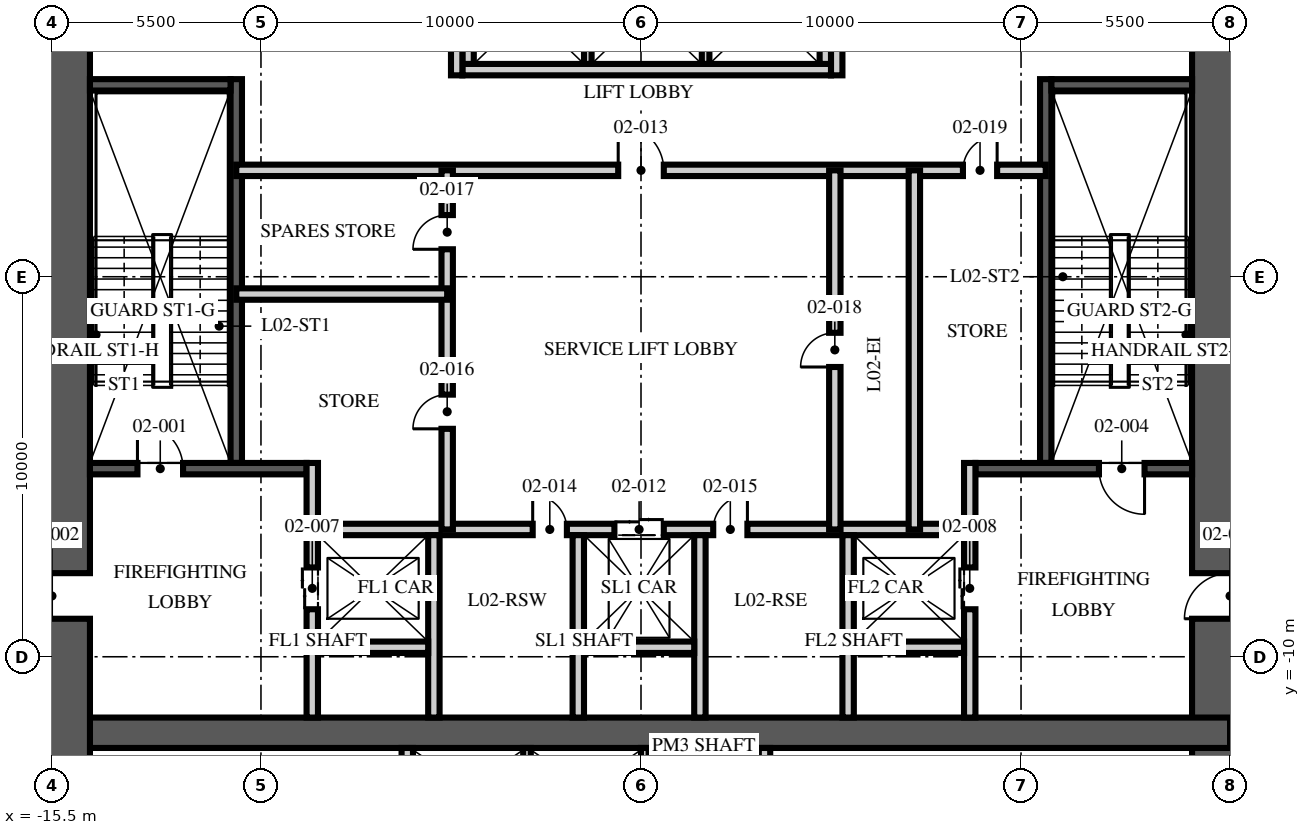
"""IFC4 building model, lengths in metres.
Left out: names, types, materials, properties, quantities, classifications, styles, units other than length and angle.
Written with IfcOpenShell. Run it as: python <this file> out.ifc"""

import sys

from ifc_helpers import new_model, si_unit, direction, frame, frame_2d, origin, place, context, subcontext, project, spatial, rectangle, extrude, element, fill, save


model = new_model("IFC4")
c1 = context("Model", 3, precision=1e-05, world=origin(), true_north=direction((0.0, 1.0)))
c2 = subcontext(c1, "Body", "Model", "MODEL_VIEW")
j1 = project(units=[si_unit("LENGTHUNIT", "METRE"), si_unit("PLANEANGLEUNIT", "RADIAN")], contexts=[c1])
p1 = place(None, origin())
s1 = spatial("IfcSite", under=j1, at=p1, CompositionType="ELEMENT")
p2 = place(p1, origin())
s2 = spatial("IfcBuilding", under=s1, at=p2, CompositionType="ELEMENT")
p3 = place(p2, frame((0.0, 0.0, 11.0)))
s3 = spatial("IfcBuildingStorey", under=s2, at=p3, CompositionType="ELEMENT", Elevation=11.0)
p4 = place(p3, frame((15.5, -15.5, -0.3), z_axis=(0.0, 0.0, 1.0), x_axis=(0.0, 1.0, 0.0)))
e1 = element("IfcWall", 1, at=p4, inside=s3, PredefinedType="SHEAR", context=c2, shape_type="SweptSolid", body=[
    extrude(rectangle(XDim=31.0, YDim=2.0, at=frame_2d((15.5, 0.0))), origin(), (0.0, 0.0, 1.0), 5.0),
])
p5 = place(p4, frame((6.5, 0.0, 0.3)))
e2 = element("IfcOpeningElement", 2, at=p5, cuts=e1, PredefinedType="OPENING", context=c2, shape_type="SweptSolid", body=[
    extrude(rectangle(XDim=1.2, YDim=2.1, at=frame_2d((0.6, 1.05))), frame((0.0, 1.01, 0.0), z_axis=(0.0, -1.0, 0.0), x_axis=(1.0, 0.0, 0.0)), (0.0, 0.0, 1.0), 2.02),
])
p6 = place(p4, frame((23.0, 0.0, 0.3)))
e3 = element("IfcOpeningElement", 3, at=p6, cuts=e1, PredefinedType="OPENING", context=c2, shape_type="SweptSolid", body=[
    extrude(rectangle(XDim=1.8, YDim=2.1, at=frame_2d((0.9, 1.05))), frame((0.0, 1.01, 0.0), z_axis=(0.0, -1.0, 0.0), x_axis=(1.0, 0.0, 0.0)), (0.0, 0.0, 1.0), 2.02),
])
p7 = place(p3, frame((-15.5, -12.0, -0.3), z_axis=(0.0, 0.0, 1.0), x_axis=(1.0, 0.0, 0.0)))
e4 = element("IfcWall", 4, at=p7, inside=s3, PredefinedType="SHEAR", context=c2, shape_type="SweptSolid", body=[
    extrude(rectangle(XDim=31.0, YDim=0.8, at=frame_2d((15.5, 0.0))), origin(), (0.0, 0.0, 1.0), 5.0),
])
p8 = place(p3, frame((-15.5, -15.5, -0.3), z_axis=(0.0, 0.0, 1.0), x_axis=(0.0, 1.0, 0.0)))
e5 = element("IfcWall", 5, at=p8, inside=s3, PredefinedType="SHEAR", context=c2, shape_type="SweptSolid", body=[
    extrude(rectangle(XDim=31.0, YDim=2.0, at=frame_2d((15.5, 0.0))), origin(), (0.0, 0.0, 1.0), 5.0),
])
p9 = place(p8, frame((6.5, 0.0, 0.3)))
e6 = element("IfcOpeningElement", 6, at=p9, cuts=e5, PredefinedType="OPENING", context=c2, shape_type="SweptSolid", body=[
    extrude(rectangle(XDim=1.2, YDim=2.1, at=frame_2d((0.6, 1.05))), frame((0.0, 1.01, 0.0), z_axis=(0.0, -1.0, 0.0), x_axis=(1.0, 0.0, 0.0)), (0.0, 0.0, 1.0), 2.02),
])
p10 = place(p8, frame((23.0, 0.0, 0.3)))
e7 = element("IfcOpeningElement", 7, at=p10, cuts=e5, PredefinedType="OPENING", context=c2, shape_type="SweptSolid", body=[
    extrude(rectangle(XDim=1.8, YDim=2.1, at=frame_2d((0.9, 1.05))), frame((0.0, 1.01, 0.0), z_axis=(0.0, -1.0, 0.0), x_axis=(1.0, 0.0, 0.0)), (0.0, 0.0, 1.0), 2.02),
])
p11 = place(p3, frame((-10.65, -4.9, 0.0), z_axis=(0.0, 0.0, 1.0), x_axis=(0.0, 1.0, 0.0)))
e8 = element("IfcWall", 8, at=p11, inside=s3, PredefinedType="SOLIDWALL", context=c2, shape_type="SweptSolid", body=[
    extrude(rectangle(XDim=10.1, YDim=0.3, at=frame_2d((5.05, 0.0))), origin(), (0.0, 0.0, 1.0), 4.7),
])
p12 = place(p3, frame((-14.5, -5.05, 0.0), z_axis=(0.0, 0.0, 1.0), x_axis=(1.0, 0.0, 0.0)))
e9 = element("IfcWall", 9, at=p12, inside=s3, PredefinedType="SOLIDWALL", context=c2, shape_type="SweptSolid", body=[
    extrude(rectangle(XDim=5.7, YDim=0.3, at=frame_2d((2.85, 0.0))), origin(), (0.0, 0.0, 1.0), 4.7),
])
p13 = place(p12, frame((1.25, 0.0, 0.0)))
e10 = element("IfcOpeningElement", 10, at=p13, cuts=e9, PredefinedType="OPENING", context=c2, shape_type="SweptSolid", body=[
    extrude(rectangle(XDim=1.2, YDim=2.1, at=frame_2d((0.6, 1.05))), frame((0.0, 0.16, 0.0), z_axis=(0.0, -1.0, 0.0), x_axis=(1.0, 0.0, 0.0)), (0.0, 0.0, 1.0), 0.32),
])
p14 = place(p3, frame((-14.5, 5.05, 0.0), z_axis=(0.0, 0.0, 1.0), x_axis=(1.0, 0.0, 0.0)))
e11 = element("IfcWall", 11, at=p14, inside=s3, PredefinedType="SOLIDWALL", context=c2, shape_type="SweptSolid", body=[
    extrude(rectangle(XDim=3.7, YDim=0.3, at=frame_2d((1.85, 0.0))), origin(), (0.0, 0.0, 1.0), 4.7),
])
p15 = place(p3, frame((-8.65, -11.6, 0.0), z_axis=(0.0, 0.0, 1.0), x_axis=(0.0, 1.0, 0.0)))
e12 = element("IfcWall", 12, at=p15, inside=s3, PredefinedType="PARTITIONING", context=c2, shape_type="SweptSolid", body=[
    extrude(rectangle(XDim=6.7, YDim=0.3, at=frame_2d((3.35, 0.0))), origin(), (0.0, 0.0, 1.0), 4.7),
])
p16 = place(p15, frame((2.85, 0.0, 0.0)))
e13 = element("IfcOpeningElement", 13, at=p16, cuts=e12, PredefinedType="OPENING", context=c2, shape_type="SweptSolid", body=[
    extrude(rectangle(XDim=1.1, YDim=2.1, at=frame_2d((0.55, 1.05))), frame((0.0, 0.16, 0.0), z_axis=(0.0, -1.0, 0.0), x_axis=(1.0, 0.0, 0.0)), (0.0, 0.0, 1.0), 0.32),
])
p17 = place(p3, frame((10.65, -4.9, 0.0), z_axis=(0.0, 0.0, 1.0), x_axis=(0.0, 1.0, 0.0)))
e14 = element("IfcWall", 14, at=p17, inside=s3, PredefinedType="SOLIDWALL", context=c2, shape_type="SweptSolid", body=[
    extrude(rectangle(XDim=10.1, YDim=0.3, at=frame_2d((5.05, 0.0))), origin(), (0.0, 0.0, 1.0), 4.7),
])
p18 = place(p3, frame((14.5, -5.05, 0.0), z_axis=(0.0, 0.0, 1.0), x_axis=(-1.0, 0.0, 0.0)))
e15 = element("IfcWall", 15, at=p18, inside=s3, PredefinedType="SOLIDWALL", context=c2, shape_type="SweptSolid", body=[
    extrude(rectangle(XDim=5.7, YDim=0.3, at=frame_2d((2.85, 0.0))), origin(), (0.0, 0.0, 1.0), 4.7),
])
p19 = place(p18, frame((1.25, 0.0, 0.0)))
e16 = element("IfcOpeningElement", 16, at=p19, cuts=e15, PredefinedType="OPENING", context=c2, shape_type="SweptSolid", body=[
    extrude(rectangle(XDim=1.2, YDim=2.1, at=frame_2d((0.6, 1.05))), frame((0.0, 0.16, 0.0), z_axis=(0.0, -1.0, 0.0), x_axis=(1.0, 0.0, 0.0)), (0.0, 0.0, 1.0), 0.32),
])
p20 = place(p3, frame((14.5, 5.05, 0.0), z_axis=(0.0, 0.0, 1.0), x_axis=(-1.0, 0.0, 0.0)))
e17 = element("IfcWall", 17, at=p20, inside=s3, PredefinedType="SOLIDWALL", context=c2, shape_type="SweptSolid", body=[
    extrude(rectangle(XDim=3.7, YDim=0.3, at=frame_2d((1.85, 0.0))), origin(), (0.0, 0.0, 1.0), 4.7),
])
p21 = place(p3, frame((8.65, -11.6, 0.0), z_axis=(0.0, 0.0, 1.0), x_axis=(0.0, 1.0, 0.0)))
e18 = element("IfcWall", 18, at=p21, inside=s3, PredefinedType="PARTITIONING", context=c2, shape_type="SweptSolid", body=[
    extrude(rectangle(XDim=6.7, YDim=0.3, at=frame_2d((3.35, 0.0))), origin(), (0.0, 0.0, 1.0), 4.7),
])
p22 = place(p21, frame((2.85, 0.0, 0.0)))
e19 = element("IfcOpeningElement", 19, at=p22, cuts=e18, PredefinedType="OPENING", context=c2, shape_type="SweptSolid", body=[
    extrude(rectangle(XDim=1.1, YDim=2.1, at=frame_2d((0.55, 1.05))), frame((0.0, 0.16, 0.0), z_axis=(0.0, -1.0, 0.0), x_axis=(1.0, 0.0, 0.0)), (0.0, 0.0, 1.0), 0.32),
])
p23 = place(p3, frame((-8.5, -6.65, 0.0), z_axis=(0.0, 0.0, 1.0), x_axis=(1.0, 0.0, 0.0)))
e20 = element("IfcWall", 20, at=p23, inside=s3, PredefinedType="PARTITIONING", context=c2, shape_type="SweptSolid", body=[
    extrude(rectangle(XDim=17.0, YDim=0.3, at=frame_2d((8.5, 0.0))), origin(), (0.0, 0.0, 1.0), 4.7),
])
p24 = place(p23, frame((7.8, 0.0, 0.0)))
e21 = element("IfcOpeningElement", 21, at=p24, cuts=e20, PredefinedType="OPENING", context=c2, shape_type="SweptSolid", body=[
    extrude(rectangle(XDim=1.3, YDim=2.4, at=frame_2d((0.65, 1.2))), frame((0.0, 0.16, 0.0), z_axis=(0.0, -1.0, 0.0), x_axis=(1.0, 0.0, 0.0)), (0.0, 0.0, 1.0), 0.32),
])
p25 = place(p23, frame((5.65, 0.0, 0.0)))
e22 = element("IfcOpeningElement", 22, at=p25, cuts=e20, PredefinedType="OPENING", context=c2, shape_type="SweptSolid", body=[
    extrude(rectangle(XDim=0.9, YDim=2.1, at=frame_2d((0.45, 1.05))), frame((0.0, 0.16, 0.0), z_axis=(0.0, -1.0, 0.0), x_axis=(1.0, 0.0, 0.0)), (0.0, 0.0, 1.0), 0.32),
])
p26 = place(p23, frame((10.4, 0.0, 0.0)))
e23 = element("IfcOpeningElement", 23, at=p26, cuts=e20, PredefinedType="OPENING", context=c2, shape_type="SweptSolid", body=[
    extrude(rectangle(XDim=0.9, YDim=2.1, at=frame_2d((0.45, 1.05))), frame((0.0, 0.16, 0.0), z_axis=(0.0, -1.0, 0.0), x_axis=(1.0, 0.0, 0.0)), (0.0, 0.0, 1.0), 0.32),
])
for number, where, z_axis, x_axis in (
    (24, (-5.45, -11.6, 0.0), (0.0, 0.0, 1.0), (0.0, 1.0, 0.0)),
    (25, (-1.65, -11.6, 0.0), (0.0, 0.0, 1.0), (0.0, 1.0, 0.0)),
    (26, (1.55, -11.6, 0.0), (0.0, 0.0, 1.0), (0.0, 1.0, 0.0)),
    (27, (5.45, -11.6, 0.0), (0.0, 0.0, 1.0), (0.0, 1.0, 0.0)),
):
    element("IfcWall", number, at=place(p3, frame(where, z_axis=z_axis, x_axis=x_axis)), inside=s3, PredefinedType="PARTITIONING", context=c2, shape_type="SweptSolid", body=[
        extrude(rectangle(XDim=4.8, YDim=0.3, at=frame_2d((2.4, 0.0))), origin(), (0.0, 0.0, 1.0), 4.7),
    ])
for number, where, z_axis, x_axis in (
    (28, (-8.5, -9.75, 0.0), (0.0, 0.0, 1.0), (1.0, 0.0, 0.0)),
    (29, (-1.5, -9.75, 0.0), (0.0, 0.0, 1.0), (1.0, 0.0, 0.0)),
    (30, (5.6, -9.75, 0.0), (0.0, 0.0, 1.0), (1.0, 0.0, 0.0)),
):
    element("IfcWall", number, at=place(p3, frame(where, z_axis=z_axis, x_axis=x_axis)), inside=s3, PredefinedType="PARTITIONING", context=c2, shape_type="SweptSolid", body=[
        extrude(rectangle(XDim=2.9, YDim=0.3, at=frame_2d((1.45, 0.0))), origin(), (0.0, 0.0, 1.0), 4.7),
    ])
p27 = place(p3, frame((-4.7, 5.45, 0.0), z_axis=(0.0, 0.0, 1.0), x_axis=(1.0, 0.0, 0.0)))
e31 = element("IfcWall", 31, at=p27, inside=s3, PredefinedType="PARTITIONING", context=c2, shape_type="SweptSolid", body=[
    extrude(rectangle(XDim=9.7, YDim=0.3, at=frame_2d((4.85, 0.0))), origin(), (0.0, 0.0, 1.0), 4.7),
])
for number, where, z_axis, x_axis in (
    (32, (-4.55, 5.6, 0.0), (0.0, 0.0, 1.0), (0.0, 1.0, 0.0)),
    (33, (4.85, 5.6, 0.0), (0.0, 0.0, 1.0), (0.0, 1.0, 0.0)),
):
    element("IfcWall", number, at=place(p3, frame(where, z_axis=z_axis, x_axis=x_axis)), inside=s3, PredefinedType="PARTITIONING", context=c2, shape_type="SweptSolid", body=[
        extrude(rectangle(XDim=2.8, YDim=0.3, at=frame_2d((1.4, 0.0))), origin(), (0.0, 0.0, 1.0), 4.7),
    ])
for number, where, z_axis, x_axis in (
    (34, (-1.4, 5.6, 0.0), (0.0, 0.0, 1.0), (0.0, 1.0, 0.0)),
    (35, (1.7, 5.6, 0.0), (0.0, 0.0, 1.0), (0.0, 1.0, 0.0)),
):
    element("IfcWall", number, at=place(p3, frame(where, z_axis=z_axis, x_axis=x_axis)), inside=s3, PredefinedType="PARTITIONING", context=c2, shape_type="SweptSolid", body=[
        extrude(rectangle(XDim=2.8, YDim=0.2, at=frame_2d((1.4, 0.0))), origin(), (0.0, 0.0, 1.0), 4.7),
    ])
for number, where, z_axis, x_axis in (
    (36, (-6.15, -14.5, 0.0), (0.0, 0.0, 1.0), (0.0, 1.0, 0.0)),
    (37, (3.25, -14.5, 0.0), (0.0, 0.0, 1.0), (0.0, 1.0, 0.0)),
):
    element("IfcWall", number, at=place(p3, frame(where, z_axis=z_axis, x_axis=x_axis)), inside=s3, PredefinedType="PARTITIONING", context=c2, shape_type="SweptSolid", body=[
        extrude(rectangle(XDim=2.1, YDim=0.3, at=frame_2d((1.05, 0.0))), origin(), (0.0, 0.0, 1.0), 4.7),
    ])
for number, where, z_axis, x_axis in (
    (38, (-3.0, -14.5, 0.0), (0.0, 0.0, 1.0), (0.0, 1.0, 0.0)),
    (39, (0.1, -14.5, 0.0), (0.0, 0.0, 1.0), (0.0, 1.0, 0.0)),
):
    element("IfcWall", number, at=place(p3, frame(where, z_axis=z_axis, x_axis=x_axis)), inside=s3, PredefinedType="PARTITIONING", context=c2, shape_type="SweptSolid", body=[
        extrude(rectangle(XDim=2.1, YDim=0.2, at=frame_2d((1.05, 0.0))), origin(), (0.0, 0.0, 1.0), 4.7),
    ])
p28 = place(p3, frame((-10.65, 2.8, 0.0), z_axis=(0.0, 0.0, 1.0), x_axis=(1.0, 0.0, 0.0)))
e40 = element("IfcWall", 40, at=p28, inside=s3, PredefinedType="PARTITIONING", context=c2, shape_type="SweptSolid", body=[
    extrude(rectangle(XDim=21.3, YDim=0.3, at=frame_2d((10.65, 0.0))), origin(), (0.0, 0.0, 1.0), 4.7),
])
p29 = place(p28, frame((10.05, 0.0, 0.0)))
e41 = element("IfcOpeningElement", 41, at=p29, cuts=e40, PredefinedType="OPENING", context=c2, shape_type="SweptSolid", body=[
    extrude(rectangle(XDim=1.2, YDim=2.1, at=frame_2d((0.6, 1.05))), frame((0.0, 0.16, 0.0), z_axis=(0.0, -1.0, 0.0), x_axis=(1.0, 0.0, 0.0)), (0.0, 0.0, 1.0), 0.32),
])
p30 = place(p28, frame((19.121, 0.0, 0.0)))
e42 = element("IfcOpeningElement", 42, at=p30, cuts=e40, PredefinedType="OPENING", context=c2, shape_type="SweptSolid", body=[
    extrude(rectangle(XDim=0.9, YDim=2.1, at=frame_2d((0.45, 1.05))), frame((0.0, 0.16, 0.0), z_axis=(0.0, -1.0, 0.0), x_axis=(1.0, 0.0, 0.0)), (0.0, 0.0, 1.0), 0.32),
])
p31 = place(p3, frame((-5.1, -6.65, 0.0), z_axis=(0.0, 0.0, 1.0), x_axis=(0.0, 1.0, 0.0)))
e43 = element("IfcWall", 43, at=p31, inside=s3, PredefinedType="PARTITIONING", context=c2, shape_type="SweptSolid", body=[
    extrude(rectangle(XDim=9.45, YDim=0.3, at=frame_2d((4.725, 0.0))), origin(), (0.0, 0.0, 1.0), 4.7),
])
p32 = place(p31, frame((2.648, 0.0, 0.0)))
e44 = element("IfcOpeningElement", 44, at=p32, cuts=e43, PredefinedType="OPENING", context=c2, shape_type="SweptSolid", body=[
    extrude(rectangle(XDim=0.9, YDim=2.1, at=frame_2d((0.45, 1.05))), frame((0.0, 0.16, 0.0), z_axis=(0.0, -1.0, 0.0), x_axis=(1.0, 0.0, 0.0)), (0.0, 0.0, 1.0), 0.32),
])
p33 = place(p31, frame((7.373, 0.0, 0.0)))
e45 = element("IfcOpeningElement", 45, at=p33, cuts=e43, PredefinedType="OPENING", context=c2, shape_type="SweptSolid", body=[
    extrude(rectangle(XDim=0.9, YDim=2.1, at=frame_2d((0.45, 1.05))), frame((0.0, 0.16, 0.0), z_axis=(0.0, -1.0, 0.0), x_axis=(1.0, 0.0, 0.0)), (0.0, 0.0, 1.0), 0.32),
])
p34 = place(p3, frame((5.1, -6.65, 0.0), z_axis=(0.0, 0.0, 1.0), x_axis=(0.0, 1.0, 0.0)))
e46 = element("IfcWall", 46, at=p34, inside=s3, PredefinedType="PARTITIONING", context=c2, shape_type="SweptSolid", body=[
    extrude(rectangle(XDim=9.45, YDim=0.3, at=frame_2d((4.725, 0.0))), origin(), (0.0, 0.0, 1.0), 4.7),
])
p35 = place(p34, frame((4.275, 0.0, 0.0)))
e47 = element("IfcOpeningElement", 47, at=p35, cuts=e46, PredefinedType="OPENING", context=c2, shape_type="SweptSolid", body=[
    extrude(rectangle(XDim=0.9, YDim=2.1, at=frame_2d((0.45, 1.05))), frame((0.0, 0.16, 0.0), z_axis=(0.0, -1.0, 0.0), x_axis=(1.0, 0.0, 0.0)), (0.0, 0.0, 1.0), 0.32),
])
p36 = place(p3, frame((-10.65, -0.455, 0.0), z_axis=(0.0, 0.0, 1.0), x_axis=(1.0, 0.0, 0.0)))
e48 = element("IfcWall", 48, at=p36, inside=s3, PredefinedType="PARTITIONING", context=c2, shape_type="SweptSolid", body=[
    extrude(rectangle(XDim=5.55, YDim=0.3, at=frame_2d((2.775, 0.0))), origin(), (0.0, 0.0, 1.0), 4.7),
])
p37 = place(p3, frame((7.193, -6.65, 0.0), z_axis=(0.0, 0.0, 1.0), x_axis=(0.0, 1.0, 0.0)))
e49 = element("IfcWall", 49, at=p37, inside=s3, PredefinedType="PARTITIONING", context=c2, shape_type="SweptSolid", body=[
    extrude(rectangle(XDim=9.45, YDim=0.3, at=frame_2d((4.725, 0.0))), origin(), (0.0, 0.0, 1.0), 4.7),
])
p38 = place(p3, frame((-4.85, 5.3, 0.0), z_axis=(0.0, 0.0, 1.0), x_axis=(0.0, 1.0, 0.0)))
e50 = element("IfcWall", 50, at=p38, inside=s3, PredefinedType="PARTITIONING", context=c2, shape_type="SweptSolid", body=[
    extrude(rectangle(XDim=6.3, YDim=0.3, at=frame_2d((3.15, 0.0))), origin(), (0.0, 0.0, 1.0), 4.7),
])
p39 = place(p38, frame((4.35, 0.0, 0.0)))
e51 = element("IfcOpeningElement", 51, at=p39, cuts=e50, PredefinedType="OPENING", context=c2, shape_type="SweptSolid", body=[
    extrude(rectangle(XDim=0.9, YDim=2.1, at=frame_2d((0.45, 1.05))), frame((0.0, 0.16, 0.0), z_axis=(0.0, -1.0, 0.0), x_axis=(1.0, 0.0, 0.0)), (0.0, 0.0, 1.0), 0.32),
])
p40 = place(p3, frame((5.15, 5.3, 0.0), z_axis=(0.0, 0.0, 1.0), x_axis=(0.0, 1.0, 0.0)))
e52 = element("IfcWall", 52, at=p40, inside=s3, PredefinedType="PARTITIONING", context=c2, shape_type="SweptSolid", body=[
    extrude(rectangle(XDim=6.3, YDim=0.3, at=frame_2d((3.15, 0.0))), origin(), (0.0, 0.0, 1.0), 4.7),
])
p41 = place(p13, origin())
e53 = element("IfcDoor", 53, at=p41, inside=s3, OperationType="SINGLE_SWING_LEFT", PredefinedType="DOOR", context=c2, shape_type="SweptSolid", body=[
    extrude(rectangle(XDim=1.2, YDim=2.1, at=frame_2d((0.6, 1.05))), frame((0.0, 0.025, 0.0), z_axis=(0.0, -1.0, 0.0), x_axis=(1.0, 0.0, 0.0)), (0.0, 0.0, 1.0), 0.05),
])
fill(e10, e53)
p42 = place(p9, origin())
e54 = element("IfcDoor", 54, at=p42, inside=s3, OperationType="SINGLE_SWING_LEFT", PredefinedType="DOOR", context=c2, shape_type="SweptSolid", body=[
    extrude(rectangle(XDim=1.2, YDim=2.1, at=frame_2d((0.6, 1.05))), frame((0.0, 0.025, 0.0), z_axis=(0.0, -1.0, 0.0), x_axis=(1.0, 0.0, 0.0)), (0.0, 0.0, 1.0), 0.05),
])
fill(e6, e54)
p43 = place(p19, origin())
e55 = element("IfcDoor", 55, at=p43, inside=s3, OperationType="SINGLE_SWING_LEFT", PredefinedType="DOOR", context=c2, shape_type="SweptSolid", body=[
    extrude(rectangle(XDim=1.2, YDim=2.1, at=frame_2d((0.6, 1.05))), frame((0.0, 0.025, 0.0), z_axis=(0.0, -1.0, 0.0), x_axis=(1.0, 0.0, 0.0)), (0.0, 0.0, 1.0), 0.05),
])
fill(e16, e55)
p44 = place(p5, origin())
e56 = element("IfcDoor", 56, at=p44, inside=s3, OperationType="SINGLE_SWING_LEFT", PredefinedType="DOOR", context=c2, shape_type="SweptSolid", body=[
    extrude(rectangle(XDim=1.2, YDim=2.1, at=frame_2d((0.6, 1.05))), frame((0.0, 0.025, 0.0), z_axis=(0.0, -1.0, 0.0), x_axis=(1.0, 0.0, 0.0)), (0.0, 0.0, 1.0), 0.05),
])
fill(e2, e56)
p45 = place(p16, origin())
e57 = element("IfcDoor", 57, at=p45, inside=s3, OperationType="DOUBLE_DOOR_SLIDING", PredefinedType="DOOR", context=c2, shape_type="SweptSolid", body=[
    extrude(rectangle(XDim=1.1, YDim=2.1, at=frame_2d((0.55, 1.05))), frame((0.0, 0.025, 0.0), z_axis=(0.0, -1.0, 0.0), x_axis=(1.0, 0.0, 0.0)), (0.0, 0.0, 1.0), 0.05),
])
fill(e13, e57)
p46 = place(p22, origin())
e58 = element("IfcDoor", 58, at=p46, inside=s3, OperationType="DOUBLE_DOOR_SLIDING", PredefinedType="DOOR", context=c2, shape_type="SweptSolid", body=[
    extrude(rectangle(XDim=1.1, YDim=2.1, at=frame_2d((0.55, 1.05))), frame((0.0, 0.025, 0.0), z_axis=(0.0, -1.0, 0.0), x_axis=(1.0, 0.0, 0.0)), (0.0, 0.0, 1.0), 0.05),
])
fill(e19, e58)
p47 = place(p24, origin())
e59 = element("IfcDoor", 59, at=p47, inside=s3, OperationType="DOUBLE_DOOR_SLIDING", PredefinedType="DOOR", context=c2, shape_type="SweptSolid", body=[
    extrude(rectangle(XDim=1.3, YDim=2.4, at=frame_2d((0.65, 1.2))), frame((0.0, 0.025, 0.0), z_axis=(0.0, -1.0, 0.0), x_axis=(1.0, 0.0, 0.0)), (0.0, 0.0, 1.0), 0.05),
])
fill(e21, e59)
p48 = place(p29, origin())
e60 = element("IfcDoor", 60, at=p48, inside=s3, OperationType="SINGLE_SWING_LEFT", PredefinedType="DOOR", context=c2, shape_type="SweptSolid", body=[
    extrude(rectangle(XDim=1.2, YDim=2.1, at=frame_2d((0.6, 1.05))), frame((0.0, 0.025, 0.0), z_axis=(0.0, -1.0, 0.0), x_axis=(1.0, 0.0, 0.0)), (0.0, 0.0, 1.0), 0.05),
])
fill(e41, e60)
p49 = place(p25, origin())
e61 = element("IfcDoor", 61, at=p49, inside=s3, OperationType="SINGLE_SWING_LEFT", PredefinedType="DOOR", context=c2, shape_type="SweptSolid", body=[
    extrude(rectangle(XDim=0.9, YDim=2.1, at=frame_2d((0.45, 1.05))), frame((0.0, 0.025, 0.0), z_axis=(0.0, -1.0, 0.0), x_axis=(1.0, 0.0, 0.0)), (0.0, 0.0, 1.0), 0.05),
])
fill(e22, e61)
p50 = place(p26, origin())
e62 = element("IfcDoor", 62, at=p50, inside=s3, OperationType="SINGLE_SWING_RIGHT", PredefinedType="DOOR", context=c2, shape_type="SweptSolid", body=[
    extrude(rectangle(XDim=0.9, YDim=2.1, at=frame_2d((0.45, 1.05))), frame((0.0, 0.025, 0.0), z_axis=(0.0, -1.0, 0.0), x_axis=(1.0, 0.0, 0.0)), (0.0, 0.0, 1.0), 0.05),
])
fill(e23, e62)
p51 = place(p32, origin())
e63 = element("IfcDoor", 63, at=p51, inside=s3, OperationType="SINGLE_SWING_LEFT", PredefinedType="DOOR", context=c2, shape_type="SweptSolid", body=[
    extrude(rectangle(XDim=0.9, YDim=2.1, at=frame_2d((0.45, 1.05))), frame((0.0, 0.025, 0.0), z_axis=(0.0, -1.0, 0.0), x_axis=(1.0, 0.0, 0.0)), (0.0, 0.0, 1.0), 0.05),
])
fill(e44, e63)
p52 = place(p33, origin())
e64 = element("IfcDoor", 64, at=p52, inside=s3, OperationType="SINGLE_SWING_LEFT", PredefinedType="DOOR", context=c2, shape_type="SweptSolid", body=[
    extrude(rectangle(XDim=0.9, YDim=2.1, at=frame_2d((0.45, 1.05))), frame((0.0, 0.025, 0.0), z_axis=(0.0, -1.0, 0.0), x_axis=(1.0, 0.0, 0.0)), (0.0, 0.0, 1.0), 0.05),
])
fill(e45, e64)
p53 = place(p35, origin())
e65 = element("IfcDoor", 65, at=p53, inside=s3, OperationType="SINGLE_SWING_LEFT", PredefinedType="DOOR", context=c2, shape_type="SweptSolid", body=[
    extrude(rectangle(XDim=0.9, YDim=2.1, at=frame_2d((0.45, 1.05))), frame((0.0, 0.025, 0.0), z_axis=(0.0, -1.0, 0.0), x_axis=(1.0, 0.0, 0.0)), (0.0, 0.0, 1.0), 0.05),
])
fill(e47, e65)
p54 = place(p30, origin())
e66 = element("IfcDoor", 66, at=p54, inside=s3, OperationType="SINGLE_SWING_RIGHT", PredefinedType="DOOR", context=c2, shape_type="SweptSolid", body=[
    extrude(rectangle(XDim=0.9, YDim=2.1, at=frame_2d((0.45, 1.05))), frame((0.0, 0.025, 0.0), z_axis=(0.0, -1.0, 0.0), x_axis=(1.0, 0.0, 0.0)), (0.0, 0.0, 1.0), 0.05),
])
fill(e42, e66)
save(model, sys.argv[1])
